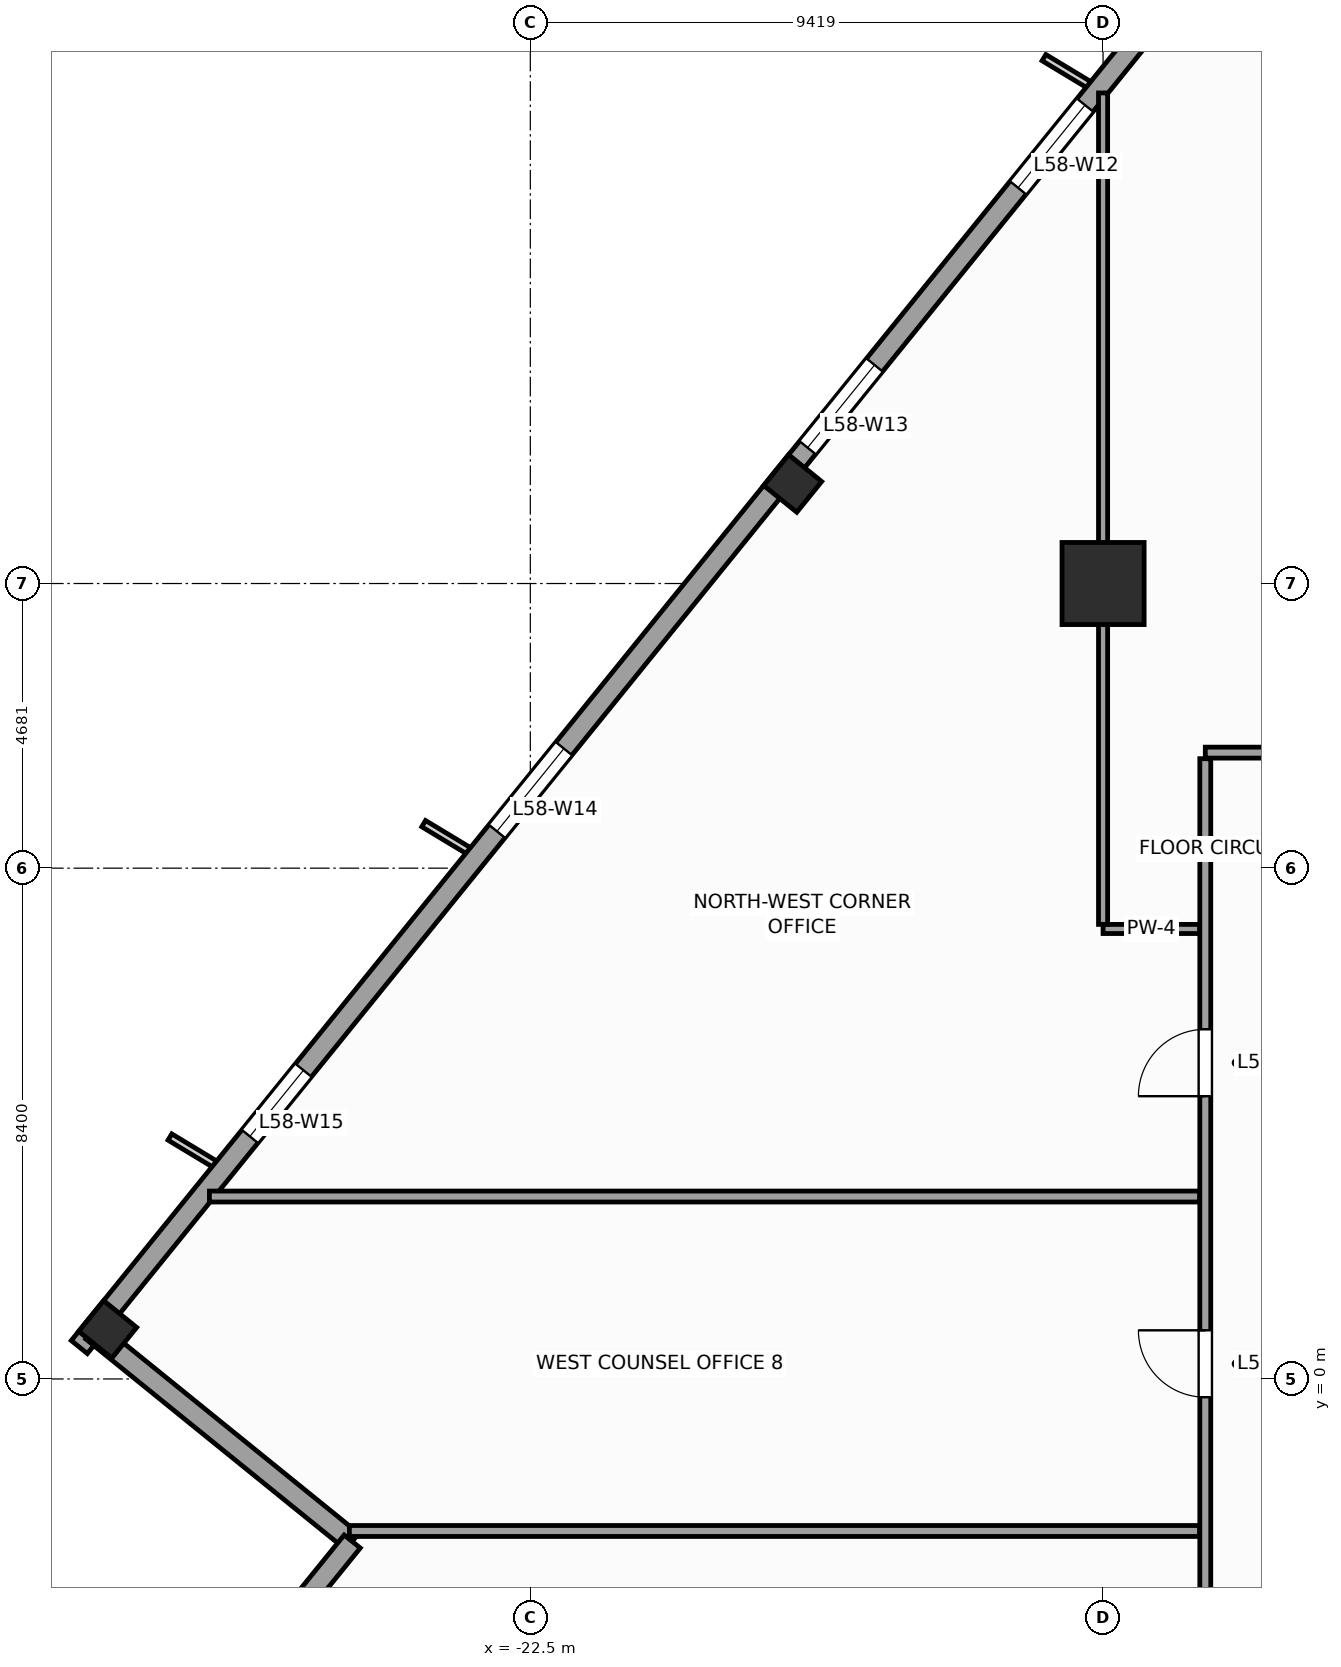
"""IFC4 building model, lengths in metres.
Left out: names, types, materials, properties, quantities, classifications, styles, units other than length and angle.
Written with IfcOpenShell. Run it as: python <this file> out.ifc"""

import sys

from ifc_helpers import new_model, si_unit, direction, frame, frame_2d, origin, origin_2d, place, context, subcontext, project, spatial, rectangle, extrude, source, transform, mapped, element, fill, save


model = new_model("IFC4")
c1 = context("Model", 3, precision=1e-05, world=origin(), true_north=direction((0.0, 1.0)))
c2 = subcontext(c1, "Body", "Model", "MODEL_VIEW")
j1 = project(units=[si_unit("LENGTHUNIT", "METRE"), si_unit("PLANEANGLEUNIT", "RADIAN")], contexts=[c1])
p1 = place(None, origin())
s1 = spatial("IfcSite", under=j1, at=p1, CompositionType="ELEMENT")
p2 = place(p1, origin())
s2 = spatial("IfcBuilding", under=s1, at=p2, CompositionType="ELEMENT")
p3 = place(p2, frame((0.0, 0.0, 240.7)))
s3 = spatial("IfcBuildingStorey", under=s2, at=p3, CompositionType="ELEMENT", Elevation=240.7)
m1 = source(origin(), c2, "Body", "SweptSolid", [
    extrude(rectangle(XDim=1.35, YDim=1.35, at=origin_2d()), origin(), (0.0, 0.0, 1.0), 3.9),
])
p4 = place(p3, frame((-13.081, 13.081, 0.0), z_axis=(0.0, 0.0, 1.0), x_axis=(1.0, 0.0, 0.0)))
e1 = element("IfcColumn", 1, at=p4, inside=s3, PredefinedType="COLUMN", context=c2, shape_type="MappedRepresentation", body=[
    mapped(m1, transform((0.0, 0.0, 0.0), scale=1.0)),
])
m2 = source(origin(), c2, "Body", "SweptSolid", [
    extrude(rectangle(XDim=0.65, YDim=0.7, at=origin_2d()), origin(), (0.0, 0.0, 1.0), 3.9),
])
for number, where, z_axis, x_axis in (
    (2, (-18.185, 14.726, 0.0), (0.0, 0.0, 1.0), (0.629, 0.777, 0.0)),
    (3, (-29.45, 0.815, 0.0), (0.0, 0.0, 1.0), (0.629, 0.777, 0.0)),
):
    element("IfcColumn", number, at=place(p3, frame(where, z_axis=z_axis, x_axis=x_axis)), inside=s3, PredefinedType="COLUMN", context=c2, shape_type="MappedRepresentation", body=[
        mapped(m2, transform((0.0, 0.0, 0.0), scale=1.0)),
    ])
p5 = place(p3, frame((-6.733, 29.154, 0.0), z_axis=(0.0, 0.0, 1.0), x_axis=(-0.629325378072, -0.77714192302, 0.0)))
e4 = element("IfcWall", 4, at=p5, inside=s3, PredefinedType="STANDARD", context=c2, shape_type="SweptSolid", body=[
    extrude(rectangle(XDim=36.84, YDim=0.34, at=frame_2d((18.42, 0.0))), origin(), (0.0, 0.0, 1.0), 2.96),
])
p6 = place(p5, frame((3.721, 0.0, 0.48)))
e5 = element("IfcOpeningElement", 5, at=p6, cuts=e4, PredefinedType="OPENING", context=c2, shape_type="SweptSolid", body=[
    extrude(rectangle(XDim=1.4, YDim=2.4, at=frame_2d((0.7, 1.2))), frame((0.0, 0.18, 0.0), z_axis=(0.0, -1.0, 0.0), x_axis=(1.0, 0.0, 0.0)), (0.0, 0.0, 1.0), 0.36),
])
p7 = place(p5, frame((10.559, 0.0, 0.58)))
e6 = element("IfcOpeningElement", 6, at=p7, cuts=e4, PredefinedType="OPENING", context=c2, shape_type="SweptSolid", body=[
    extrude(rectangle(XDim=1.75, YDim=2.3, at=frame_2d((0.875, 1.15))), frame((0.0, 0.18, 0.0), z_axis=(0.0, -1.0, 0.0), x_axis=(1.0, 0.0, 0.0)), (0.0, 0.0, 1.0), 0.36),
])
p8 = place(p5, frame((16.058, 0.0, 0.58)))
e7 = element("IfcOpeningElement", 7, at=p8, cuts=e4, PredefinedType="OPENING", context=c2, shape_type="SweptSolid", body=[
    extrude(rectangle(XDim=1.75, YDim=2.3, at=frame_2d((0.875, 1.15))), frame((0.0, 0.18, 0.0), z_axis=(0.0, -1.0, 0.0), x_axis=(1.0, 0.0, 0.0)), (0.0, 0.0, 1.0), 0.36),
])
p9 = place(p5, frame((24.176, 0.0, 0.58)))
e8 = element("IfcOpeningElement", 8, at=p9, cuts=e4, PredefinedType="OPENING", context=c2, shape_type="SweptSolid", body=[
    extrude(rectangle(XDim=1.75, YDim=2.3, at=frame_2d((0.875, 1.15))), frame((0.0, 0.18, 0.0), z_axis=(0.0, -1.0, 0.0), x_axis=(1.0, 0.0, 0.0)), (0.0, 0.0, 1.0), 0.36),
])
p10 = place(p5, frame((30.982, 0.0, 0.48)))
e9 = element("IfcOpeningElement", 9, at=p10, cuts=e4, PredefinedType="OPENING", context=c2, shape_type="SweptSolid", body=[
    extrude(rectangle(XDim=1.4, YDim=2.4, at=frame_2d((0.7, 1.2))), frame((0.0, 0.18, 0.0), z_axis=(0.0, -1.0, 0.0), x_axis=(1.0, 0.0, 0.0)), (0.0, 0.0, 1.0), 0.36),
])
p11 = place(p3, frame((-29.703, 0.789, 0.0), z_axis=(0.0, 0.0, 1.0), x_axis=(0.77714355312, -0.629323365087, 0.0)))
e10 = element("IfcWall", 10, at=p11, inside=s3, PredefinedType="STANDARD", context=c2, shape_type="SweptSolid", body=[
    extrude(rectangle(XDim=5.5, YDim=0.34, at=frame_2d((2.75, 0.0))), origin(), (0.0, 0.0, 1.0), 3.66),
])
p12 = place(p3, frame((-25.429, -2.673, 0.0), z_axis=(0.0, 0.0, 1.0), x_axis=(-0.629299794138, -0.777162640055, 0.0)))
e11 = element("IfcWall", 11, at=p12, inside=s3, PredefinedType="STANDARD", context=c2, shape_type="SweptSolid", body=[
    extrude(rectangle(XDim=5.67, YDim=0.34, at=frame_2d((2.835, 0.0))), origin(), (0.0, 0.0, 1.0), 3.66),
])
p13 = place(p12, frame((2.135, 0.0, 0.48)))
e12 = element("IfcOpeningElement", 12, at=p13, cuts=e11, PredefinedType="OPENING", context=c2, shape_type="SweptSolid", body=[
    extrude(rectangle(XDim=1.4, YDim=2.4, at=frame_2d((0.7, 1.2))), frame((0.0, 0.18, 0.0), z_axis=(0.0, -1.0, 0.0), x_axis=(1.0, 0.0, 0.0)), (0.0, 0.0, 1.0), 0.36),
])
p14 = place(p3, frame((-11.4, 10.3, 0.0), z_axis=(0.0, 0.0, 1.0), x_axis=(1.0, 0.0, 0.0)))
e13 = element("IfcWall", 13, at=p14, inside=s3, PredefinedType="PARTITIONING", context=c2, shape_type="SweptSolid", body=[
    extrude(rectangle(XDim=21.7, YDim=0.18, at=frame_2d((10.85, 0.0))), origin(), (0.0, 0.0, 1.0), 3.66),
])
p15 = place(p14, frame((10.925, 0.0, 0.0)))
e14 = element("IfcOpeningElement", 14, at=p15, cuts=e13, PredefinedType="OPENING", context=c2, shape_type="SweptSolid", body=[
    extrude(rectangle(XDim=0.95, YDim=2.1, at=frame_2d((0.475, 1.05))), frame((0.0, 0.1, 0.0), z_axis=(0.0, -1.0, 0.0), x_axis=(1.0, 0.0, 0.0)), (0.0, 0.0, 1.0), 0.2),
])
p16 = place(p14, frame((3.724, 0.0, 0.0)))
e15 = element("IfcOpeningElement", 15, at=p16, cuts=e13, PredefinedType="OPENING", context=c2, shape_type="SweptSolid", body=[
    extrude(rectangle(XDim=1.1, YDim=2.2, at=frame_2d((0.55, 1.1))), frame((0.0, 0.1, 0.0), z_axis=(0.0, -1.0, 0.0), x_axis=(1.0, 0.0, 0.0)), (0.0, 0.0, 1.0), 0.2),
])
p17 = place(p14, frame((8.326, 0.0, 0.0)))
e16 = element("IfcOpeningElement", 16, at=p17, cuts=e13, PredefinedType="OPENING", context=c2, shape_type="SweptSolid", body=[
    extrude(rectangle(XDim=1.1, YDim=2.2, at=frame_2d((0.55, 1.1))), frame((0.0, 0.1, 0.0), z_axis=(0.0, -1.0, 0.0), x_axis=(1.0, 0.0, 0.0)), (0.0, 0.0, 1.0), 0.2),
])
p18 = place(p14, frame((18.085, 0.0, 0.0)))
e17 = element("IfcOpeningElement", 17, at=p18, cuts=e13, PredefinedType="OPENING", context=c2, shape_type="SweptSolid", body=[
    extrude(rectangle(XDim=1.1, YDim=2.2, at=frame_2d((0.55, 1.1))), frame((0.0, 0.1, 0.0), z_axis=(0.0, -1.0, 0.0), x_axis=(1.0, 0.0, 0.0)), (0.0, 0.0, 1.0), 0.2),
])
p19 = place(p3, frame((-11.4, -10.2, 0.0), z_axis=(0.0, 0.0, 1.0), x_axis=(0.0, 1.0, 0.0)))
e18 = element("IfcWall", 18, at=p19, inside=s3, PredefinedType="PARTITIONING", context=c2, shape_type="SweptSolid", body=[
    extrude(rectangle(XDim=20.4, YDim=0.18, at=frame_2d((10.2, 0.0))), origin(), (0.0, 0.0, 1.0), 3.66),
])
p20 = place(p19, frame((14.85, 0.0, 0.0)))
e19 = element("IfcOpeningElement", 19, at=p20, cuts=e18, PredefinedType="OPENING", context=c2, shape_type="SweptSolid", body=[
    extrude(rectangle(XDim=1.1, YDim=2.2, at=frame_2d((0.55, 1.1))), frame((0.0, 0.1, 0.0), z_axis=(0.0, -1.0, 0.0), x_axis=(1.0, 0.0, 0.0)), (0.0, 0.0, 1.0), 0.2),
])
p21 = place(p19, frame((4.7, 0.0, 0.0)))
e20 = element("IfcOpeningElement", 20, at=p21, cuts=e18, PredefinedType="OPENING", context=c2, shape_type="SweptSolid", body=[
    extrude(rectangle(XDim=1.1, YDim=2.2, at=frame_2d((0.55, 1.1))), frame((0.0, 0.1, 0.0), z_axis=(0.0, -1.0, 0.0), x_axis=(1.0, 0.0, 0.0)), (0.0, 0.0, 1.0), 0.2),
])
p22 = place(p19, frame((9.9, 0.0, 0.0)))
e21 = element("IfcOpeningElement", 21, at=p22, cuts=e18, PredefinedType="OPENING", context=c2, shape_type="SweptSolid", body=[
    extrude(rectangle(XDim=1.1, YDim=2.2, at=frame_2d((0.55, 1.1))), frame((0.0, 0.1, 0.0), z_axis=(0.0, -1.0, 0.0), x_axis=(1.0, 0.0, 0.0)), (0.0, 0.0, 1.0), 0.2),
])
p23 = place(p3, frame((-11.495, -2.5, 0.0), z_axis=(0.0, 0.0, 1.0), x_axis=(-1.0, 0.0, 0.0)))
e22 = element("IfcWall", 22, at=p23, inside=s3, PredefinedType="PARTITIONING", context=c2, shape_type="SweptSolid", body=[
    extrude(rectangle(XDim=13.98, YDim=0.18, at=frame_2d((6.99, 0.0))), origin(), (0.0, 0.0, 1.0), 3.66),
])
p24 = place(p3, frame((-11.495, 3.0, 0.0), z_axis=(0.0, 0.0, 1.0), x_axis=(-1.0, 0.0, 0.0)))
e23 = element("IfcWall", 23, at=p24, inside=s3, PredefinedType="PARTITIONING", context=c2, shape_type="SweptSolid", body=[
    extrude(rectangle(XDim=16.282, YDim=0.18, at=frame_2d((8.141, 0.0))), origin(), (0.0, 0.0, 1.0), 3.66),
])
p25 = place(p3, frame((-11.495, 7.4, 0.0), z_axis=(0.0, 0.0, 1.0), x_axis=(-1.0, 0.0, 0.0)))
e24 = element("IfcWall", 24, at=p25, inside=s3, PredefinedType="PARTITIONING", context=c2, shape_type="SweptSolid", body=[
    extrude(rectangle(XDim=1.586, YDim=0.15, at=frame_2d((0.793, 0.0))), origin(), (0.0, 0.0, 1.0), 3.66),
])
p26 = place(p3, frame((-13.081, 7.475, 0.0), z_axis=(0.0, 0.0, 1.0), x_axis=(0.0, 1.0, 0.0)))
e25 = element("IfcWall", 25, at=p26, inside=s3, PredefinedType="PARTITIONING", context=c2, shape_type="SweptSolid", body=[
    extrude(rectangle(XDim=13.673, YDim=0.15, at=frame_2d((6.837, 0.0))), origin(), (0.0, 0.0, 1.0), 2.76),
])
m3 = source(origin(), c2, "Body", "SweptSolid", [
    extrude(rectangle(XDim=1.75, YDim=2.3, at=frame_2d((0.875, 1.15))), frame((0.0, 0.03, 0.0), z_axis=(0.0, -1.0, 0.0), x_axis=(1.0, 0.0, 0.0)), (0.0, 0.0, 1.0), 0.06),
])
p27 = place(p7, origin())
e26 = element("IfcWindow", 26, at=p27, inside=s3, PartitioningType="SINGLE_PANEL", PredefinedType="WINDOW", context=c2, shape_type="MappedRepresentation", body=[
    mapped(m3, transform((0.0, 0.0, 0.0), scale=1.0)),
])
fill(e6, e26)
p28 = place(p8, origin())
e27 = element("IfcWindow", 27, at=p28, inside=s3, PartitioningType="SINGLE_PANEL", PredefinedType="WINDOW", context=c2, shape_type="MappedRepresentation", body=[
    mapped(m3, transform((0.0, 0.0, 0.0), scale=1.0)),
])
fill(e7, e27)
p29 = place(p9, origin())
e28 = element("IfcWindow", 28, at=p29, inside=s3, PartitioningType="SINGLE_PANEL", PredefinedType="WINDOW", context=c2, shape_type="MappedRepresentation", body=[
    mapped(m3, transform((0.0, 0.0, 0.0), scale=1.0)),
])
fill(e8, e28)
m4 = source(origin(), c2, "Body", "SweptSolid", [
    extrude(rectangle(XDim=1.4, YDim=2.4, at=frame_2d((0.7, 1.2))), frame((0.0, 0.03, 0.0), z_axis=(0.0, -1.0, 0.0), x_axis=(1.0, 0.0, 0.0)), (0.0, 0.0, 1.0), 0.06),
])
p30 = place(p10, origin())
e29 = element("IfcWindow", 29, at=p30, inside=s3, PartitioningType="SINGLE_PANEL", PredefinedType="WINDOW", context=c2, shape_type="MappedRepresentation", body=[
    mapped(m4, transform((0.0, 0.0, 0.0), scale=1.0)),
])
fill(e9, e29)
m5 = source(origin(), c2, "Body", "SweptSolid", [
    extrude(rectangle(XDim=1.1, YDim=2.2, at=frame_2d((0.55, 1.1))), frame((0.0, 0.025, 0.0), z_axis=(0.0, -1.0, 0.0), x_axis=(1.0, 0.0, 0.0)), (0.0, 0.0, 1.0), 0.05),
])
p31 = place(p20, origin())
e30 = element("IfcDoor", 30, at=p31, inside=s3, OperationType="SINGLE_SWING_LEFT", PredefinedType="DOOR", context=c2, shape_type="MappedRepresentation", body=[
    mapped(m5, transform((0.0, 0.0, 0.0), scale=1.0)),
])
fill(e19, e30)
p32 = place(p22, origin())
e31 = element("IfcDoor", 31, at=p32, inside=s3, OperationType="SINGLE_SWING_RIGHT", PredefinedType="DOOR", context=c2, shape_type="MappedRepresentation", body=[
    mapped(m5, transform((0.0, 0.0, 0.0), scale=1.0)),
])
fill(e21, e31)
save(model, sys.argv[1])
